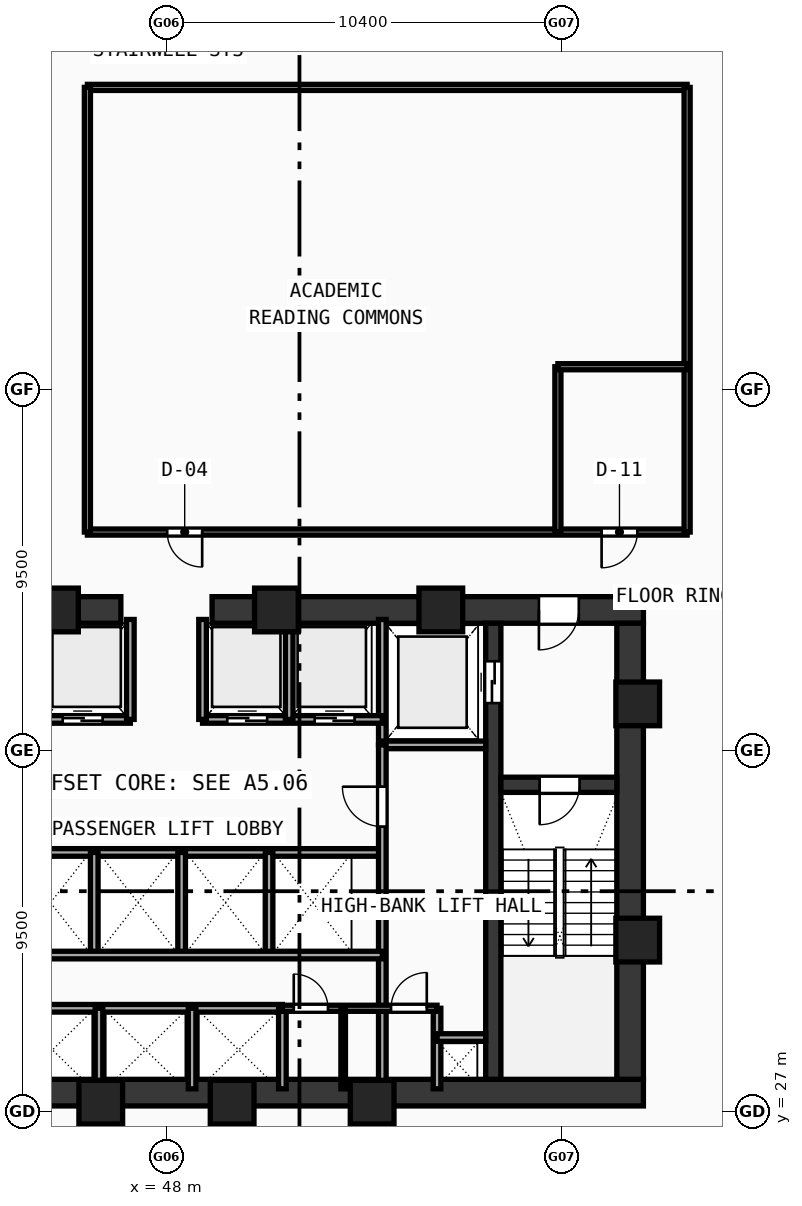
"""IFC4 building model, lengths in metres.
Left out: names, types, materials, properties, quantities, classifications, styles, units other than length and angle.
Written with IfcOpenShell. Run it as: python <this file> out.ifc"""

import sys

from ifc_helpers import new_model, si_unit, direction, frame, frame_2d, origin, origin_with_axes, origin_2d, place, context, subcontext, project, spatial, rectangle, hollow_rectangle, extrude, source, transform, mapped, element, fill, save


model = new_model("IFC4")
c1 = context("Model", 3, precision=1e-05, world=origin(), true_north=direction((0.0, 1.0)))
c2 = subcontext(c1, "Body", "Model", "MODEL_VIEW")
j1 = project(units=[si_unit("LENGTHUNIT", "METRE"), si_unit("PLANEANGLEUNIT", "RADIAN")], contexts=[c1])
p1 = place(None, origin())
s1 = spatial("IfcSite", under=j1, at=p1, CompositionType="ELEMENT")
p2 = place(p1, origin())
s2 = spatial("IfcBuilding", under=s1, at=p2, CompositionType="ELEMENT")
p3 = place(p2, frame((0.0, 0.0, 66.7)))
s3 = spatial("IfcBuildingStorey", under=s2, at=p3, CompositionType="ELEMENT", Elevation=66.7)
p4 = place(p3, frame((35.45, 27.5, 0.0), z_axis=(0.0, 0.0, 1.0), x_axis=(1.0, 0.0, 0.0)))
e1 = element("IfcWall", 1, at=p4, inside=s3, PredefinedType="SHEAR", context=c2, shape_type="SweptSolid", body=[
    extrude(rectangle(XDim=25.1, YDim=0.7, at=frame_2d((12.55, 0.0))), origin(), (0.0, 0.0, 1.0), 3.37),
])
p5 = place(p3, frame((35.45, 40.2, 0.0), z_axis=(0.0, 0.0, 1.0), x_axis=(1.0, 0.0, 0.0)))
e2 = element("IfcWall", 2, at=p5, inside=s3, PredefinedType="SHEAR", context=c2, shape_type="SweptSolid", body=[
    extrude(rectangle(XDim=11.35, YDim=0.7, at=frame_2d((5.675, 0.0))), origin(), (0.0, 0.0, 1.0), 3.37),
])
p6 = place(p5, frame((1.7, 0.0, 0.0)))
e3 = element("IfcOpeningElement", 3, at=p6, cuts=e2, PredefinedType="OPENING", context=c2, shape_type="SweptSolid", body=[
    extrude(rectangle(XDim=1.05, YDim=2.1, at=frame_2d((0.525, 1.05))), frame((0.0, 0.36, 0.0), z_axis=(0.0, -1.0, 0.0), x_axis=(1.0, 0.0, 0.0)), (0.0, 0.0, 1.0), 0.72),
])
p7 = place(p3, frame((49.2, 40.2, 0.0), z_axis=(0.0, 0.0, 1.0), x_axis=(1.0, 0.0, 0.0)))
e4 = element("IfcWall", 4, at=p7, inside=s3, PredefinedType="SHEAR", context=c2, shape_type="SweptSolid", body=[
    extrude(rectangle(XDim=11.35, YDim=0.7, at=frame_2d((5.675, 0.0))), origin(), (0.0, 0.0, 1.0), 3.37),
])
p8 = place(p7, frame((8.6, 0.0, 0.0)))
e5 = element("IfcOpeningElement", 5, at=p8, cuts=e4, PredefinedType="OPENING", context=c2, shape_type="SweptSolid", body=[
    extrude(rectangle(XDim=1.05, YDim=2.1, at=frame_2d((0.525, 1.05))), frame((0.0, 0.36, 0.0), z_axis=(0.0, -1.0, 0.0), x_axis=(1.0, 0.0, 0.0)), (0.0, 0.0, 1.0), 0.72),
])
p9 = place(p3, frame((60.2, 27.85, 0.0), z_axis=(0.0, 0.0, 1.0), x_axis=(0.0, 1.0, 0.0)))
e6 = element("IfcWall", 6, at=p9, inside=s3, PredefinedType="SHEAR", context=c2, shape_type="SweptSolid", body=[
    extrude(rectangle(XDim=12.0, YDim=0.7, at=frame_2d((6.0, 0.0))), origin(), (0.0, 0.0, 1.0), 3.37),
])
p10 = place(p3, frame((56.6, 27.85, 0.0), z_axis=(0.0, 0.0, 1.0), x_axis=(0.0, 1.0, 0.0)))
e7 = element("IfcWall", 7, at=p10, inside=s3, PredefinedType="SHEAR", context=c2, shape_type="SweptSolid", body=[
    extrude(rectangle(XDim=12.0, YDim=0.4, at=frame_2d((6.0, 0.0))), origin(), (0.0, 0.0, 1.0), 3.37),
])
p11 = place(p10, frame((9.9, 0.0, 0.0)))
e8 = element("IfcOpeningElement", 8, at=p11, cuts=e7, PredefinedType="OPENING", context=c2, shape_type="SweptSolid", body=[
    extrude(rectangle(XDim=1.1, YDim=2.1, at=frame_2d((0.55, 1.05))), frame((0.0, 0.21, 0.0), z_axis=(0.0, -1.0, 0.0), x_axis=(1.0, 0.0, 0.0)), (0.0, 0.0, 1.0), 0.42),
])
p12 = place(p3, frame((56.8, 35.6, 0.0), z_axis=(0.0, 0.0, 1.0), x_axis=(1.0, 0.0, 0.0)))
e9 = element("IfcWall", 9, at=p12, inside=s3, PredefinedType="SHEAR", context=c2, shape_type="SweptSolid", body=[
    extrude(rectangle(XDim=3.05, YDim=0.4, at=frame_2d((1.525, 0.0))), origin(), (0.0, 0.0, 1.0), 3.37),
])
p13 = place(p12, frame((1.02, 0.0, 0.0)))
e10 = element("IfcOpeningElement", 10, at=p13, cuts=e9, PredefinedType="OPENING", context=c2, shape_type="SweptSolid", body=[
    extrude(rectangle(XDim=1.05, YDim=2.1, at=frame_2d((0.525, 1.05))), frame((0.0, 0.21, 0.0), z_axis=(0.0, -1.0, 0.0), x_axis=(1.0, 0.0, 0.0)), (0.0, 0.0, 1.0), 0.42),
])
m1 = source(origin(), c2, "Body", "SweptSolid", [
    extrude(hollow_rectangle(XDim=1.15, YDim=1.15, WallThickness=0.048, at=origin_2d()), origin(), (0.0, 0.0, 1.0), 3.63),
])
for number, where, z_axis, x_axis in (
    (11, (46.272, 27.25, -0.26), (0.0, 0.0, 1.0), (1.0, 0.0, 0.0)),
    (12, (49.729, 27.25, -0.26), (0.0, 0.0, 1.0), (1.0, 0.0, 0.0)),
    (13, (53.412, 27.25, -0.26), (0.0, 0.0, 1.0), (1.0, 0.0, 0.0)),
    (14, (60.4, 31.513, -0.26), (0.0, 0.0, 1.0), (1.0, 0.0, 0.0)),
    (15, (60.4, 37.729, -0.26), (0.0, 0.0, 1.0), (1.0, 0.0, 0.0)),
    (16, (55.219, 40.2, -0.26), (0.0, 0.0, 1.0), (1.0, 0.0, 0.0)),
    (17, (50.894, 40.2, -0.26), (0.0, 0.0, 1.0), (1.0, 0.0, 0.0)),
    (18, (45.106, 40.2, -0.26), (0.0, 0.0, 1.0), (1.0, 0.0, 0.0)),
):
    element("IfcColumn", number, at=place(p3, frame(where, z_axis=z_axis, x_axis=x_axis)), inside=s3, PredefinedType="COLUMN", context=c2, shape_type="MappedRepresentation", body=[
        mapped(m1, transform((0.0, 0.0, 0.0), scale=1.0)),
    ])
p14 = place(p3, frame((53.68, 36.65, 0.0), z_axis=(0.0, 0.0, 1.0), x_axis=(0.0, 1.0, 0.0)))
e19 = element("IfcWall", 19, at=p14, inside=s3, PredefinedType="SOLIDWALL", context=c2, shape_type="SweptSolid", body=[
    extrude(rectangle(XDim=3.3, YDim=0.2, at=frame_2d((1.65, 0.0))), origin(), (0.0, 0.0, 1.0), 3.37),
])
p15 = place(p3, frame((53.68, 36.65, 0.0), z_axis=(0.0, 0.0, 1.0), x_axis=(1.0, 0.0, 0.0)))
e20 = element("IfcWall", 20, at=p15, inside=s3, PredefinedType="SOLIDWALL", context=c2, shape_type="SweptSolid", body=[
    extrude(rectangle(XDim=2.72, YDim=0.2, at=frame_2d((1.36, 0.0))), origin(), (0.0, 0.0, 1.0), 3.37),
])
p16 = place(p3, frame((42.32, 37.32, 0.0), z_axis=(0.0, 0.0, 1.0), x_axis=(1.0, 0.0, 0.0)))
e21 = element("IfcWall", 21, at=p16, inside=s3, PredefinedType="SOLIDWALL", context=c2, shape_type="SweptSolid", body=[
    extrude(rectangle(XDim=4.73, YDim=0.2, at=frame_2d((2.365, 0.0))), origin(), (0.0, 0.0, 1.0), 3.37),
])
p17 = place(p16, frame((0.65, 0.0, 0.0)))
e22 = element("IfcOpeningElement", 22, at=p17, cuts=e21, PredefinedType="OPENING", context=c2, shape_type="SweptSolid", body=[
    extrude(rectangle(XDim=1.05, YDim=2.1, at=frame_2d((0.525, 1.05))), frame((0.0, 0.11, 0.0), z_axis=(0.0, -1.0, 0.0), x_axis=(1.0, 0.0, 0.0)), (0.0, 0.0, 1.0), 0.22),
])
p18 = place(p16, frame((2.95, 0.0, 0.0)))
e23 = element("IfcOpeningElement", 23, at=p18, cuts=e21, PredefinedType="OPENING", context=c2, shape_type="SweptSolid", body=[
    extrude(rectangle(XDim=1.05, YDim=2.1, at=frame_2d((0.525, 1.05))), frame((0.0, 0.11, 0.0), z_axis=(0.0, -1.0, 0.0), x_axis=(1.0, 0.0, 0.0)), (0.0, 0.0, 1.0), 0.22),
])
p19 = place(p3, frame((48.95, 37.32, 0.0), z_axis=(0.0, 0.0, 1.0), x_axis=(1.0, 0.0, 0.0)))
e24 = element("IfcWall", 24, at=p19, inside=s3, PredefinedType="SOLIDWALL", context=c2, shape_type="SweptSolid", body=[
    extrude(rectangle(XDim=4.73, YDim=0.2, at=frame_2d((2.365, 0.0))), origin(), (0.0, 0.0, 1.0), 3.37),
])
p20 = place(p19, frame((0.65, 0.0, 0.0)))
e25 = element("IfcOpeningElement", 25, at=p20, cuts=e24, PredefinedType="OPENING", context=c2, shape_type="SweptSolid", body=[
    extrude(rectangle(XDim=1.05, YDim=2.1, at=frame_2d((0.525, 1.05))), frame((0.0, 0.11, 0.0), z_axis=(0.0, -1.0, 0.0), x_axis=(1.0, 0.0, 0.0)), (0.0, 0.0, 1.0), 0.22),
])
p21 = place(p19, frame((2.95, 0.0, 0.0)))
e26 = element("IfcOpeningElement", 26, at=p21, cuts=e24, PredefinedType="OPENING", context=c2, shape_type="SweptSolid", body=[
    extrude(rectangle(XDim=1.05, YDim=2.1, at=frame_2d((0.525, 1.05))), frame((0.0, 0.11, 0.0), z_axis=(0.0, -1.0, 0.0), x_axis=(1.0, 0.0, 0.0)), (0.0, 0.0, 1.0), 0.22),
])
for number, where, z_axis, x_axis in (
    (27, (47.05, 37.32, 0.0), (0.0, 0.0, 1.0), (0.0, 1.0, 0.0)),
    (28, (48.95, 37.32, 0.0), (0.0, 0.0, 1.0), (0.0, 1.0, 0.0)),
    (29, (51.23, 37.32, 0.0), (0.0, 0.0, 1.0), (0.0, 1.0, 0.0)),
):
    element("IfcWall", number, at=place(p3, frame(where, z_axis=z_axis, x_axis=x_axis)), inside=s3, PredefinedType="SOLIDWALL", context=c2, shape_type="SweptSolid", body=[
        extrude(rectangle(XDim=2.63, YDim=0.2, at=frame_2d((1.315, 0.0))), origin(), (0.0, 0.0, 1.0), 3.37),
    ])
p22 = place(p3, frame((43.85, 33.82, 0.0), z_axis=(0.0, 0.0, 1.0), x_axis=(1.0, 0.0, 0.0)))
e30 = element("IfcWall", 30, at=p22, inside=s3, PredefinedType="SOLIDWALL", context=c2, shape_type="SweptSolid", body=[
    extrude(rectangle(XDim=9.83, YDim=0.2, at=frame_2d((4.915, 0.0))), origin(), (0.0, 0.0, 1.0), 3.37),
])
p23 = place(p3, frame((53.68, 27.6, 0.0), z_axis=(0.0, 0.0, 1.0), x_axis=(0.0, 1.0, 0.0)))
e31 = element("IfcWall", 31, at=p23, inside=s3, PredefinedType="SOLIDWALL", context=c2, shape_type="SweptSolid", body=[
    extrude(rectangle(XDim=9.05, YDim=0.2, at=frame_2d((4.525, 0.0))), origin(), (0.0, 0.0, 1.0), 3.37),
])
p24 = place(p23, frame((6.9, 0.0, 0.0)))
e32 = element("IfcOpeningElement", 32, at=p24, cuts=e31, PredefinedType="OPENING", context=c2, shape_type="SweptSolid", body=[
    extrude(rectangle(XDim=1.05, YDim=2.1, at=frame_2d((0.525, 1.05))), frame((0.0, 0.11, 0.0), z_axis=(0.0, -1.0, 0.0), x_axis=(1.0, 0.0, 0.0)), (0.0, 0.0, 1.0), 0.22),
])
for number, where, z_axis, x_axis in (
    (33, (46.1, 31.12, 0.0), (0.0, 0.0, 1.0), (0.0, 1.0, 0.0)),
    (34, (48.4, 31.12, 0.0), (0.0, 0.0, 1.0), (0.0, 1.0, 0.0)),
    (35, (50.7, 31.12, 0.0), (0.0, 0.0, 1.0), (0.0, 1.0, 0.0)),
):
    element("IfcWall", number, at=place(p3, frame(where, z_axis=z_axis, x_axis=x_axis)), inside=s3, PredefinedType="SOLIDWALL", context=c2, shape_type="SweptSolid", body=[
        extrude(rectangle(XDim=2.7, YDim=0.2, at=frame_2d((1.35, 0.0))), origin(), (0.0, 0.0, 1.0), 3.37),
    ])
p25 = place(p3, frame((43.85, 29.72, 0.0), z_axis=(0.0, 0.0, 1.0), x_axis=(1.0, 0.0, 0.0)))
e36 = element("IfcWall", 36, at=p25, inside=s3, PredefinedType="SOLIDWALL", context=c2, shape_type="SweptSolid", body=[
    extrude(rectangle(XDim=7.2, YDim=0.2, at=frame_2d((3.6, 0.0))), origin(), (0.0, 0.0, 1.0), 3.37),
])
p26 = place(p3, frame((51.05, 27.6, 0.0), z_axis=(0.0, 0.0, 1.0), x_axis=(0.0, 1.0, 0.0)))
e37 = element("IfcWall", 37, at=p26, inside=s3, PredefinedType="SOLIDWALL", context=c2, shape_type="SweptSolid", body=[
    extrude(rectangle(XDim=2.12, YDim=0.2, at=frame_2d((1.06, 0.0))), origin(), (0.0, 0.0, 1.0), 3.37),
])
p27 = place(p3, frame((43.85, 31.12, 0.0), z_axis=(0.0, 0.0, 1.0), x_axis=(1.0, 0.0, 0.0)))
e38 = element("IfcWall", 38, at=p27, inside=s3, PredefinedType="SOLIDWALL", context=c2, shape_type="SweptSolid", body=[
    extrude(rectangle(XDim=9.83, YDim=0.2, at=frame_2d((4.915, 0.0))), origin(), (0.0, 0.0, 1.0), 3.37),
])
for number, where, z_axis, x_axis in (
    (39, (46.225, 27.6, 0.0), (0.0, 0.0, 1.0), (0.0, 1.0, 0.0)),
    (40, (48.675, 27.6, 0.0), (0.0, 0.0, 1.0), (0.0, 1.0, 0.0)),
    (41, (55.12, 27.6, 0.0), (0.0, 0.0, 1.0), (0.0, 1.0, 0.0)),
):
    element("IfcWall", number, at=place(p3, frame(where, z_axis=z_axis, x_axis=x_axis)), inside=s3, PredefinedType="SOLIDWALL", context=c2, shape_type="SweptSolid", body=[
        extrude(rectangle(XDim=2.12, YDim=0.2, at=frame_2d((1.06, 0.0))), origin(), (0.0, 0.0, 1.0), 3.37),
    ])
p28 = place(p3, frame((55.12, 28.95, 0.0), z_axis=(0.0, 0.0, 1.0), x_axis=(1.0, 0.0, 0.0)))
e42 = element("IfcWall", 42, at=p28, inside=s3, PredefinedType="SOLIDWALL", context=c2, shape_type="SweptSolid", body=[
    extrude(rectangle(XDim=1.28, YDim=0.2, at=frame_2d((0.64, 0.0))), origin(), (0.0, 0.0, 1.0), 3.37),
])
p29 = place(p3, frame((51.05, 29.72, 0.0), z_axis=(0.0, 0.0, 1.0), x_axis=(1.0, 0.0, 0.0)))
e43 = element("IfcWall", 43, at=p29, inside=s3, PredefinedType="PARTITIONING", context=c2, shape_type="SweptSolid", body=[
    extrude(rectangle(XDim=4.07, YDim=0.16, at=frame_2d((2.035, 0.0))), origin(), (0.0, 0.0, 1.0), 3.37),
])
p30 = place(p29, frame((0.3, 0.0, 0.0)))
e44 = element("IfcOpeningElement", 44, at=p30, cuts=e43, PredefinedType="OPENING", context=c2, shape_type="SweptSolid", body=[
    extrude(rectangle(XDim=0.9, YDim=2.1, at=frame_2d((0.45, 1.05))), frame((0.0, 0.09, 0.0), z_axis=(0.0, -1.0, 0.0), x_axis=(1.0, 0.0, 0.0)), (0.0, 0.0, 1.0), 0.18),
])
p31 = place(p29, frame((2.86, 0.0, 0.0)))
e45 = element("IfcOpeningElement", 45, at=p31, cuts=e43, PredefinedType="OPENING", context=c2, shape_type="SweptSolid", body=[
    extrude(rectangle(XDim=0.94, YDim=2.1, at=frame_2d((0.47, 1.05))), frame((0.0, 0.09, 0.0), z_axis=(0.0, -1.0, 0.0), x_axis=(1.0, 0.0, 0.0)), (0.0, 0.0, 1.0), 0.18),
])
p32 = place(p3, frame((52.65, 27.6, 0.0), z_axis=(0.0, 0.0, 1.0), x_axis=(0.0, 1.0, 0.0)))
e46 = element("IfcWall", 46, at=p32, inside=s3, PredefinedType="PARTITIONING", context=c2, shape_type="SweptSolid", body=[
    extrude(rectangle(XDim=2.12, YDim=0.12, at=frame_2d((1.06, 0.0))), origin(), (0.0, 0.0, 1.0), 3.37),
])
p33 = place(p3, frame((45.92, 42.25, 0.0), z_axis=(0.0, 0.0, 1.0), x_axis=(1.0, 0.0, 0.0)))
e47 = element("IfcWall", 47, at=p33, inside=s3, PredefinedType="PARTITIONING", context=c2, shape_type="SweptSolid", body=[
    extrude(rectangle(XDim=15.78, YDim=0.16, at=frame_2d((7.89, 0.0))), origin(), (0.0, 0.0, 1.0), 2.67),
])
p34 = place(p33, frame((2.1, 0.0, 0.0)))
e48 = element("IfcOpeningElement", 48, at=p34, cuts=e47, PredefinedType="OPENING", context=c2, shape_type="SweptSolid", body=[
    extrude(rectangle(XDim=0.92, YDim=2.1, at=frame_2d((0.46, 1.05))), frame((0.0, 0.09, 0.0), z_axis=(0.0, -1.0, 0.0), x_axis=(1.0, 0.0, 0.0)), (0.0, 0.0, 1.0), 0.18),
])
p35 = place(p33, frame((13.53, 0.0, 0.0)))
e49 = element("IfcOpeningElement", 49, at=p35, cuts=e47, PredefinedType="OPENING", context=c2, shape_type="SweptSolid", body=[
    extrude(rectangle(XDim=0.94, YDim=2.1, at=frame_2d((0.47, 1.05))), frame((0.0, 0.09, 0.0), z_axis=(0.0, -1.0, 0.0), x_axis=(1.0, 0.0, 0.0)), (0.0, 0.0, 1.0), 0.18),
])
p36 = place(p3, frame((45.92, 53.95, 0.0), z_axis=(0.0, 0.0, 1.0), x_axis=(1.0, 0.0, 0.0)))
e50 = element("IfcWall", 50, at=p36, inside=s3, PredefinedType="PARTITIONING", context=c2, shape_type="SweptSolid", body=[
    extrude(rectangle(XDim=15.78, YDim=0.16, at=frame_2d((7.89, 0.0))), origin(), (0.0, 0.0, 1.0), 2.67),
])
p37 = place(p3, frame((45.92, 42.25, 0.0), z_axis=(0.0, 0.0, 1.0), x_axis=(0.0, 1.0, 0.0)))
e51 = element("IfcWall", 51, at=p37, inside=s3, PredefinedType="PARTITIONING", context=c2, shape_type="SweptSolid", body=[
    extrude(rectangle(XDim=11.7, YDim=0.16, at=frame_2d((5.85, 0.0))), origin(), (0.0, 0.0, 1.0), 2.97),
])
p38 = place(p3, frame((61.7, 42.25, 0.0), z_axis=(0.0, 0.0, 1.0), x_axis=(0.0, 1.0, 0.0)))
e52 = element("IfcWall", 52, at=p38, inside=s3, PredefinedType="PARTITIONING", context=c2, shape_type="SweptSolid", body=[
    extrude(rectangle(XDim=11.7, YDim=0.16, at=frame_2d((5.85, 0.0))), origin(), (0.0, 0.0, 1.0), 2.67),
])
p39 = place(p3, frame((58.3, 42.25, 0.0), z_axis=(0.0, 0.0, 1.0), x_axis=(0.0, 1.0, 0.0)))
e53 = element("IfcWall", 53, at=p39, inside=s3, PredefinedType="PARTITIONING", context=c2, shape_type="SweptSolid", body=[
    extrude(rectangle(XDim=4.35, YDim=0.16, at=frame_2d((2.175, 0.0))), origin(), (0.0, 0.0, 1.0), 2.67),
])
p40 = place(p3, frame((58.3, 46.6, 0.0), z_axis=(0.0, 0.0, 1.0), x_axis=(1.0, 0.0, 0.0)))
e54 = element("IfcWall", 54, at=p40, inside=s3, PredefinedType="PARTITIONING", context=c2, shape_type="SweptSolid", body=[
    extrude(rectangle(XDim=3.4, YDim=0.16, at=frame_2d((1.7, 0.0))), origin(), (0.0, 0.0, 1.0), 2.97),
])
m2 = source(origin(), c2, "Body", "SweptSolid", [
    extrude(rectangle(XDim=1.05, YDim=2.1, at=frame_2d((0.525, 1.05))), frame((0.0, 0.025, 0.0), z_axis=(0.0, -1.0, 0.0), x_axis=(1.0, 0.0, 0.0)), (0.0, 0.0, 1.0), 0.05),
])
p41 = place(p13, frame((1.05, 0.0, 0.0), z_axis=(0.0, 0.0, 1.0), x_axis=(-1.0, 0.0, 0.0)))
e55 = element("IfcDoor", 55, at=p41, inside=s3, OperationType="SINGLE_SWING_RIGHT", PredefinedType="DOOR", context=c2, shape_type="MappedRepresentation", body=[
    mapped(m2, transform((0.0, 0.0, 0.0), scale=1.0)),
])
fill(e10, e55)
p42 = place(p8, frame((1.05, 0.0, 0.0), z_axis=(0.0, 0.0, 1.0), x_axis=(-1.0, 0.0, 0.0)))
e56 = element("IfcDoor", 56, at=p42, inside=s3, OperationType="SINGLE_SWING_RIGHT", PredefinedType="DOOR", context=c2, shape_type="MappedRepresentation", body=[
    mapped(m2, transform((0.0, 0.0, 0.0), scale=1.0)),
])
fill(e5, e56)
m3 = source(origin(), c2, "Body", "SweptSolid", [
    extrude(rectangle(XDim=1.1, YDim=2.1, at=frame_2d((0.55, 1.05))), frame((0.0, 0.025, 0.0), z_axis=(0.0, -1.0, 0.0), x_axis=(1.0, 0.0, 0.0)), (0.0, 0.0, 1.0), 0.05),
])
p43 = place(p11, origin_with_axes())
e57 = element("IfcDoor", 57, at=p43, inside=s3, OperationType="DOUBLE_DOOR_SLIDING", PredefinedType="DOOR", context=c2, shape_type="MappedRepresentation", body=[
    mapped(m3, transform((0.0, 0.0, 0.0), scale=1.0)),
])
fill(e8, e57)
p44 = place(p18, frame((1.05, 0.0, 0.0), z_axis=(0.0, 0.0, 1.0), x_axis=(-1.0, 0.0, 0.0)))
e58 = element("IfcDoor", 58, at=p44, inside=s3, OperationType="DOUBLE_DOOR_SLIDING", PredefinedType="DOOR", context=c2, shape_type="MappedRepresentation", body=[
    mapped(m2, transform((0.0, 0.0, 0.0), scale=1.0)),
])
fill(e23, e58)
p45 = place(p20, frame((1.05, 0.0, 0.0), z_axis=(0.0, 0.0, 1.0), x_axis=(-1.0, 0.0, 0.0)))
e59 = element("IfcDoor", 59, at=p45, inside=s3, OperationType="DOUBLE_DOOR_SLIDING", PredefinedType="DOOR", context=c2, shape_type="MappedRepresentation", body=[
    mapped(m2, transform((0.0, 0.0, 0.0), scale=1.0)),
])
fill(e25, e59)
p46 = place(p21, frame((1.05, 0.0, 0.0), z_axis=(0.0, 0.0, 1.0), x_axis=(-1.0, 0.0, 0.0)))
e60 = element("IfcDoor", 60, at=p46, inside=s3, OperationType="DOUBLE_DOOR_SLIDING", PredefinedType="DOOR", context=c2, shape_type="MappedRepresentation", body=[
    mapped(m2, transform((0.0, 0.0, 0.0), scale=1.0)),
])
fill(e26, e60)
p47 = place(p24, origin_with_axes())
e61 = element("IfcDoor", 61, at=p47, inside=s3, OperationType="SINGLE_SWING_RIGHT", PredefinedType="DOOR", context=c2, shape_type="MappedRepresentation", body=[
    mapped(m2, transform((0.0, 0.0, 0.0), scale=1.0)),
])
fill(e32, e61)
m4 = source(origin(), c2, "Body", "SweptSolid", [
    extrude(rectangle(XDim=0.9, YDim=2.1, at=frame_2d((0.45, 1.05))), frame((0.0, 0.025, 0.0), z_axis=(0.0, -1.0, 0.0), x_axis=(1.0, 0.0, 0.0)), (0.0, 0.0, 1.0), 0.05),
])
p48 = place(p30, origin_with_axes())
e62 = element("IfcDoor", 62, at=p48, inside=s3, OperationType="SINGLE_SWING_LEFT", PredefinedType="DOOR", context=c2, shape_type="MappedRepresentation", body=[
    mapped(m4, transform((0.0, 0.0, 0.0), scale=1.0)),
])
fill(e44, e62)
m5 = source(origin(), c2, "Body", "SweptSolid", [
    extrude(rectangle(XDim=0.94, YDim=2.1, at=frame_2d((0.47, 1.05))), frame((0.0, 0.025, 0.0), z_axis=(0.0, -1.0, 0.0), x_axis=(1.0, 0.0, 0.0)), (0.0, 0.0, 1.0), 0.05),
])
p49 = place(p31, origin_with_axes())
e63 = element("IfcDoor", 63, at=p49, inside=s3, OperationType="SINGLE_SWING_RIGHT", PredefinedType="DOOR", context=c2, shape_type="MappedRepresentation", body=[
    mapped(m5, transform((0.0, 0.0, 0.0), scale=1.0)),
])
fill(e45, e63)
m6 = source(origin(), c2, "Body", "SweptSolid", [
    extrude(rectangle(XDim=0.92, YDim=2.1, at=frame_2d((0.46, 1.05))), frame((0.0, 0.025, 0.0), z_axis=(0.0, -1.0, 0.0), x_axis=(1.0, 0.0, 0.0)), (0.0, 0.0, 1.0), 0.05),
])
p50 = place(p34, frame((0.92, 0.0, 0.0), z_axis=(0.0, 0.0, 1.0), x_axis=(-1.0, 0.0, 0.0)))
e64 = element("IfcDoor", 64, at=p50, inside=s3, OperationType="SINGLE_SWING_LEFT", PredefinedType="DOOR", context=c2, shape_type="MappedRepresentation", body=[
    mapped(m6, transform((0.0, 0.0, 0.0), scale=1.0)),
])
fill(e48, e64)
p51 = place(p35, frame((0.94, 0.0, 0.0), z_axis=(0.0, 0.0, 1.0), x_axis=(-1.0, 0.0, 0.0)))
e65 = element("IfcDoor", 65, at=p51, inside=s3, OperationType="SINGLE_SWING_RIGHT", PredefinedType="DOOR", context=c2, shape_type="MappedRepresentation", body=[
    mapped(m5, transform((0.0, 0.0, 0.0), scale=1.0)),
])
fill(e49, e65)
save(model, sys.argv[1])
